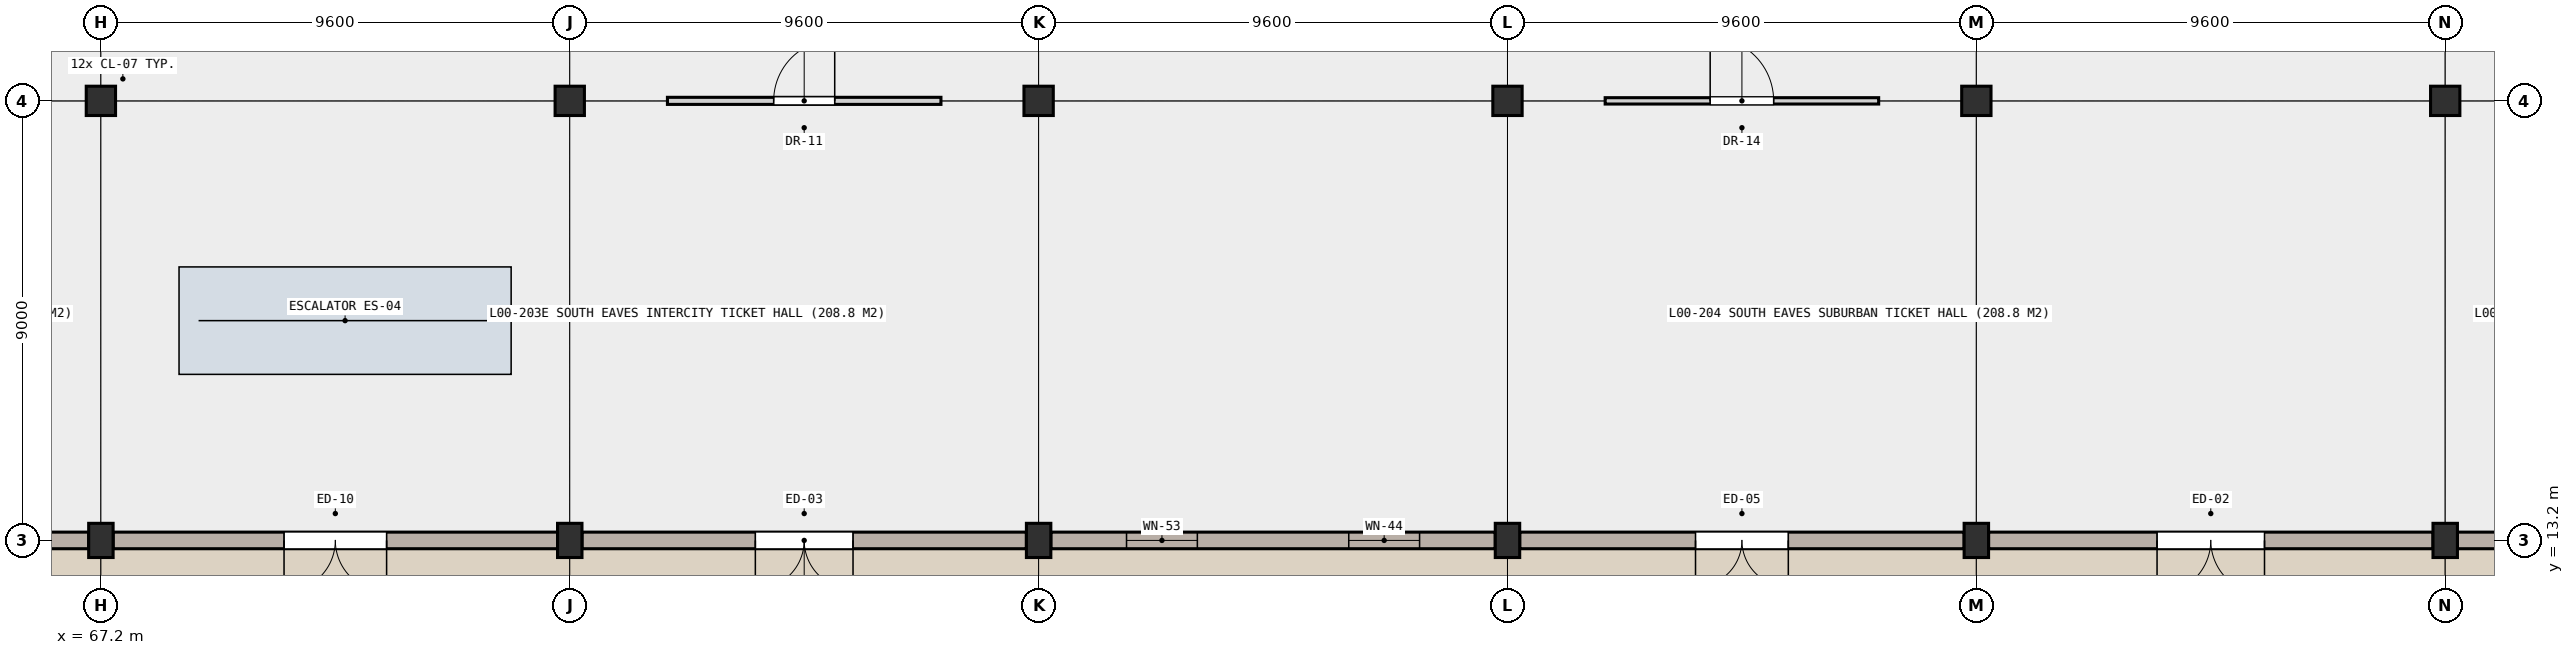
"""IFC4 building model, lengths in metres.
Left out: names, types, materials, properties, quantities, classifications, styles, units other than length and angle.
Written with IfcOpenShell. Run it as: python <this file> out.ifc"""

import sys

from ifc_helpers import new_model, si_unit, direction, frame, frame_2d, origin, origin_2d, place, context, subcontext, project, spatial, rectangle, hollow_rectangle, extrude, element, fill, save


model = new_model("IFC4")
c1 = context("Model", 3, precision=1e-05, world=origin(), true_north=direction((0.0, 1.0)))
c2 = subcontext(c1, "Body", "Model", "MODEL_VIEW")
j1 = project(units=[si_unit("LENGTHUNIT", "METRE"), si_unit("PLANEANGLEUNIT", "RADIAN")], contexts=[c1])
p1 = place(None, origin())
s1 = spatial("IfcSite", under=j1, at=p1, CompositionType="ELEMENT")
p2 = place(p1, origin())
s2 = spatial("IfcBuilding", under=s1, at=p2, CompositionType="ELEMENT")
p3 = place(p2, origin())
s3 = spatial("IfcBuildingStorey", under=s2, at=p3, CompositionType="ELEMENT", Elevation=0.0)
p4 = place(p3, frame((67.2, 13.2, 0.0), z_axis=(0.0, 0.0, 1.0), x_axis=(1.0, 0.0, 0.0)))
e1 = element("IfcColumn", 1, at=p4, inside=s3, PredefinedType="COLUMN", context=c2, shape_type="SweptSolid", body=[
    extrude(hollow_rectangle(XDim=0.5, YDim=0.7, WallThickness=0.032, at=origin_2d()), origin(), (0.0, 0.0, 1.0), 5.4),
])
p5 = place(p3, frame((67.2, 22.2, 0.0), z_axis=(0.0, 0.0, 1.0), x_axis=(1.0, 0.0, 0.0)))
e2 = element("IfcColumn", 2, at=p5, inside=s3, PredefinedType="COLUMN", context=c2, shape_type="SweptSolid", body=[
    extrude(hollow_rectangle(XDim=0.6, YDim=0.6, WallThickness=0.03, at=origin_2d()), origin(), (0.0, 0.0, 1.0), 5.4),
])
p6 = place(p3, frame((76.8, 13.2, 0.0), z_axis=(0.0, 0.0, 1.0), x_axis=(1.0, 0.0, 0.0)))
e3 = element("IfcColumn", 3, at=p6, inside=s3, PredefinedType="COLUMN", context=c2, shape_type="SweptSolid", body=[
    extrude(hollow_rectangle(XDim=0.5, YDim=0.7, WallThickness=0.032, at=origin_2d()), origin(), (0.0, 0.0, 1.0), 5.4),
])
p7 = place(p3, frame((76.8, 22.2, 0.0), z_axis=(0.0, 0.0, 1.0), x_axis=(1.0, 0.0, 0.0)))
e4 = element("IfcColumn", 4, at=p7, inside=s3, PredefinedType="COLUMN", context=c2, shape_type="SweptSolid", body=[
    extrude(hollow_rectangle(XDim=0.6, YDim=0.6, WallThickness=0.03, at=origin_2d()), origin(), (0.0, 0.0, 1.0), 5.4),
])
p8 = place(p3, frame((86.4, 13.2, 0.0), z_axis=(0.0, 0.0, 1.0), x_axis=(1.0, 0.0, 0.0)))
e5 = element("IfcColumn", 5, at=p8, inside=s3, PredefinedType="COLUMN", context=c2, shape_type="SweptSolid", body=[
    extrude(hollow_rectangle(XDim=0.5, YDim=0.7, WallThickness=0.032, at=origin_2d()), origin(), (0.0, 0.0, 1.0), 5.4),
])
p9 = place(p3, frame((86.4, 22.2, 0.0), z_axis=(0.0, 0.0, 1.0), x_axis=(1.0, 0.0, 0.0)))
e6 = element("IfcColumn", 6, at=p9, inside=s3, PredefinedType="COLUMN", context=c2, shape_type="SweptSolid", body=[
    extrude(hollow_rectangle(XDim=0.6, YDim=0.6, WallThickness=0.03, at=origin_2d()), origin(), (0.0, 0.0, 1.0), 5.4),
])
p10 = place(p3, frame((96.0, 13.2, 0.0), z_axis=(0.0, 0.0, 1.0), x_axis=(1.0, 0.0, 0.0)))
e7 = element("IfcColumn", 7, at=p10, inside=s3, PredefinedType="COLUMN", context=c2, shape_type="SweptSolid", body=[
    extrude(hollow_rectangle(XDim=0.5, YDim=0.7, WallThickness=0.032, at=origin_2d()), origin(), (0.0, 0.0, 1.0), 5.4),
])
p11 = place(p3, frame((96.0, 22.2, 0.0), z_axis=(0.0, 0.0, 1.0), x_axis=(1.0, 0.0, 0.0)))
e8 = element("IfcColumn", 8, at=p11, inside=s3, PredefinedType="COLUMN", context=c2, shape_type="SweptSolid", body=[
    extrude(hollow_rectangle(XDim=0.6, YDim=0.6, WallThickness=0.03, at=origin_2d()), origin(), (0.0, 0.0, 1.0), 5.4),
])
p12 = place(p3, frame((105.6, 13.2, 0.0), z_axis=(0.0, 0.0, 1.0), x_axis=(1.0, 0.0, 0.0)))
e9 = element("IfcColumn", 9, at=p12, inside=s3, PredefinedType="COLUMN", context=c2, shape_type="SweptSolid", body=[
    extrude(hollow_rectangle(XDim=0.5, YDim=0.7, WallThickness=0.032, at=origin_2d()), origin(), (0.0, 0.0, 1.0), 5.4),
])
p13 = place(p3, frame((105.6, 22.2, 0.0), z_axis=(0.0, 0.0, 1.0), x_axis=(1.0, 0.0, 0.0)))
e10 = element("IfcColumn", 10, at=p13, inside=s3, PredefinedType="COLUMN", context=c2, shape_type="SweptSolid", body=[
    extrude(hollow_rectangle(XDim=0.6, YDim=0.6, WallThickness=0.03, at=origin_2d()), origin(), (0.0, 0.0, 1.0), 5.4),
])
p14 = place(p3, frame((115.2, 13.2, 0.0), z_axis=(0.0, 0.0, 1.0), x_axis=(1.0, 0.0, 0.0)))
e11 = element("IfcColumn", 11, at=p14, inside=s3, PredefinedType="COLUMN", context=c2, shape_type="SweptSolid", body=[
    extrude(hollow_rectangle(XDim=0.5, YDim=0.7, WallThickness=0.032, at=origin_2d()), origin(), (0.0, 0.0, 1.0), 5.4),
])
p15 = place(p3, frame((115.2, 22.2, 0.0), z_axis=(0.0, 0.0, 1.0), x_axis=(1.0, 0.0, 0.0)))
e12 = element("IfcColumn", 12, at=p15, inside=s3, PredefinedType="COLUMN", context=c2, shape_type="SweptSolid", body=[
    extrude(hollow_rectangle(XDim=0.6, YDim=0.6, WallThickness=0.03, at=origin_2d()), origin(), (0.0, 0.0, 1.0), 5.4),
])
p16 = place(p3, frame((66.95, 13.2, 0.0), z_axis=(0.0, 0.0, 1.0), x_axis=(-1.0, 0.0, 0.0)))
e13 = element("IfcWall", 13, at=p16, inside=s3, PredefinedType="SOLIDWALL", context=c2, shape_type="SweptSolid", body=[
    extrude(rectangle(XDim=9.1, YDim=0.34, at=frame_2d((4.55, 0.0))), origin(), (0.0, 0.0, 1.0), 4.49),
])
p17 = place(p16, frame((3.45, 0.0, 0.0)))
e14 = element("IfcOpeningElement", 14, at=p17, cuts=e13, PredefinedType="OPENING", context=c2, shape_type="SweptSolid", body=[
    extrude(rectangle(XDim=2.2, YDim=2.55, at=frame_2d((1.1, 1.275))), frame((0.0, 0.18, 0.0), z_axis=(0.0, -1.0, 0.0), x_axis=(1.0, 0.0, 0.0)), (0.0, 0.0, 1.0), 0.36),
])
p18 = place(p3, frame((76.55, 13.2, 0.0), z_axis=(0.0, 0.0, 1.0), x_axis=(-1.0, 0.0, 0.0)))
e15 = element("IfcWall", 15, at=p18, inside=s3, PredefinedType="SOLIDWALL", context=c2, shape_type="SweptSolid", body=[
    extrude(rectangle(XDim=9.1, YDim=0.34, at=frame_2d((4.55, 0.0))), origin(), (0.0, 0.0, 1.0), 4.49),
])
p19 = place(p18, frame((3.5, 0.0, 0.0)))
e16 = element("IfcOpeningElement", 16, at=p19, cuts=e15, PredefinedType="OPENING", context=c2, shape_type="SweptSolid", body=[
    extrude(rectangle(XDim=2.1, YDim=2.5, at=frame_2d((1.05, 1.25))), frame((0.0, 0.18, 0.0), z_axis=(0.0, -1.0, 0.0), x_axis=(1.0, 0.0, 0.0)), (0.0, 0.0, 1.0), 0.36),
])
p20 = place(p3, frame((86.15, 13.2, 0.0), z_axis=(0.0, 0.0, 1.0), x_axis=(-1.0, 0.0, 0.0)))
e17 = element("IfcWall", 17, at=p20, inside=s3, PredefinedType="SOLIDWALL", context=c2, shape_type="SweptSolid", body=[
    extrude(rectangle(XDim=9.1, YDim=0.34, at=frame_2d((4.55, 0.0))), origin(), (0.0, 0.0, 1.0), 4.49),
])
p21 = place(p20, frame((3.55, 0.0, 0.0)))
e18 = element("IfcOpeningElement", 18, at=p21, cuts=e17, PredefinedType="OPENING", context=c2, shape_type="SweptSolid", body=[
    extrude(rectangle(XDim=2.0, YDim=2.45, at=frame_2d((1.0, 1.225))), frame((0.0, 0.18, 0.0), z_axis=(0.0, -1.0, 0.0), x_axis=(1.0, 0.0, 0.0)), (0.0, 0.0, 1.0), 0.36),
])
p22 = place(p3, frame((95.75, 13.2, 0.0), z_axis=(0.0, 0.0, 1.0), x_axis=(-1.0, 0.0, 0.0)))
e19 = element("IfcWall", 19, at=p22, inside=s3, PredefinedType="SOLIDWALL", context=c2, shape_type="SweptSolid", body=[
    extrude(rectangle(XDim=9.1, YDim=0.34, at=frame_2d((4.55, 0.0))), origin(), (0.0, 0.0, 1.0), 4.49),
])
p23 = place(p22, frame((1.55, 0.0, 0.85)))
e20 = element("IfcOpeningElement", 20, at=p23, cuts=e19, PredefinedType="OPENING", context=c2, shape_type="SweptSolid", body=[
    extrude(rectangle(XDim=1.45, YDim=1.5, at=frame_2d((0.725, 0.75))), frame((0.0, 0.18, 0.0), z_axis=(0.0, -1.0, 0.0), x_axis=(1.0, 0.0, 0.0)), (0.0, 0.0, 1.0), 0.36),
])
p24 = place(p22, frame((6.1, 0.0, 0.85)))
e21 = element("IfcOpeningElement", 21, at=p24, cuts=e19, PredefinedType="OPENING", context=c2, shape_type="SweptSolid", body=[
    extrude(rectangle(XDim=1.45, YDim=1.85, at=frame_2d((0.725, 0.925))), frame((0.0, 0.18, 0.0), z_axis=(0.0, -1.0, 0.0), x_axis=(1.0, 0.0, 0.0)), (0.0, 0.0, 1.0), 0.36),
])
p25 = place(p3, frame((105.35, 13.2, 0.0), z_axis=(0.0, 0.0, 1.0), x_axis=(-1.0, 0.0, 0.0)))
e22 = element("IfcWall", 22, at=p25, inside=s3, PredefinedType="SOLIDWALL", context=c2, shape_type="SweptSolid", body=[
    extrude(rectangle(XDim=9.1, YDim=0.34, at=frame_2d((4.55, 0.0))), origin(), (0.0, 0.0, 1.0), 4.49),
])
p26 = place(p25, frame((3.6, 0.0, 0.0)))
e23 = element("IfcOpeningElement", 23, at=p26, cuts=e22, PredefinedType="OPENING", context=c2, shape_type="SweptSolid", body=[
    extrude(rectangle(XDim=1.9, YDim=2.4, at=frame_2d((0.95, 1.2))), frame((0.0, 0.18, 0.0), z_axis=(0.0, -1.0, 0.0), x_axis=(1.0, 0.0, 0.0)), (0.0, 0.0, 1.0), 0.36),
])
p27 = place(p3, frame((114.95, 13.2, 0.0), z_axis=(0.0, 0.0, 1.0), x_axis=(-1.0, 0.0, 0.0)))
e24 = element("IfcWall", 24, at=p27, inside=s3, PredefinedType="SOLIDWALL", context=c2, shape_type="SweptSolid", body=[
    extrude(rectangle(XDim=9.1, YDim=0.34, at=frame_2d((4.55, 0.0))), origin(), (0.0, 0.0, 1.0), 4.49),
])
p28 = place(p27, frame((3.45, 0.0, 0.0)))
e25 = element("IfcOpeningElement", 25, at=p28, cuts=e24, PredefinedType="OPENING", context=c2, shape_type="SweptSolid", body=[
    extrude(rectangle(XDim=2.2, YDim=2.55, at=frame_2d((1.1, 1.275))), frame((0.0, 0.18, 0.0), z_axis=(0.0, -1.0, 0.0), x_axis=(1.0, 0.0, 0.0)), (0.0, 0.0, 1.0), 0.36),
])
p29 = place(p3, frame((124.55, 13.2, 0.0), z_axis=(0.0, 0.0, 1.0), x_axis=(-1.0, 0.0, 0.0)))
e26 = element("IfcWall", 26, at=p29, inside=s3, PredefinedType="SOLIDWALL", context=c2, shape_type="SweptSolid", body=[
    extrude(rectangle(XDim=9.1, YDim=0.34, at=frame_2d((4.55, 0.0))), origin(), (0.0, 0.0, 1.0), 4.49),
])
p30 = place(p29, frame((3.5, 0.0, 0.0)))
e27 = element("IfcOpeningElement", 27, at=p30, cuts=e26, PredefinedType="OPENING", context=c2, shape_type="SweptSolid", body=[
    extrude(rectangle(XDim=2.1, YDim=2.5, at=frame_2d((1.05, 1.25))), frame((0.0, 0.18, 0.0), z_axis=(0.0, -1.0, 0.0), x_axis=(1.0, 0.0, 0.0)), (0.0, 0.0, 1.0), 0.36),
])
p31 = place(p3, frame((78.8, 22.2, 0.0), z_axis=(0.0, 0.0, 1.0), x_axis=(1.0, 0.0, 0.0)))
e28 = element("IfcWall", 28, at=p31, inside=s3, PredefinedType="PARTITIONING", context=c2, shape_type="SweptSolid", body=[
    extrude(rectangle(XDim=5.6, YDim=0.145, at=frame_2d((2.8, 0.0))), origin(), (0.0, 0.0, 1.0), 4.49),
])
p32 = place(p31, frame((2.175, 0.0, 0.0)))
e29 = element("IfcOpeningElement", 29, at=p32, cuts=e28, PredefinedType="OPENING", context=c2, shape_type="SweptSolid", body=[
    extrude(rectangle(XDim=1.25, YDim=2.16, at=frame_2d((0.625, 1.08))), frame((0.0, 0.083, 0.0), z_axis=(0.0, -1.0, 0.0), x_axis=(1.0, 0.0, 0.0)), (0.0, 0.0, 1.0), 0.165),
])
p33 = place(p3, frame((98.0, 22.2, 0.0), z_axis=(0.0, 0.0, 1.0), x_axis=(1.0, 0.0, 0.0)))
e30 = element("IfcWall", 30, at=p33, inside=s3, PredefinedType="PARTITIONING", context=c2, shape_type="SweptSolid", body=[
    extrude(rectangle(XDim=5.6, YDim=0.13, at=frame_2d((2.8, 0.0))), origin(), (0.0, 0.0, 1.0), 4.49),
])
p34 = place(p33, frame((2.15, 0.0, 0.0)))
e31 = element("IfcOpeningElement", 31, at=p34, cuts=e30, PredefinedType="OPENING", context=c2, shape_type="SweptSolid", body=[
    extrude(rectangle(XDim=1.3, YDim=2.16, at=frame_2d((0.65, 1.08))), frame((0.0, 0.075, 0.0), z_axis=(0.0, -1.0, 0.0), x_axis=(1.0, 0.0, 0.0)), (0.0, 0.0, 1.0), 0.15),
])
p35 = place(p19, origin())
e32 = element("IfcDoor", 32, at=p35, inside=s3, OperationType="DOUBLE_DOOR_SINGLE_SWING", PredefinedType="DOOR", context=c2, shape_type="SweptSolid", body=[
    extrude(rectangle(XDim=2.1, YDim=2.5, at=frame_2d((1.05, 1.25))), frame((0.0, 0.025, 0.0), z_axis=(0.0, -1.0, 0.0), x_axis=(1.0, 0.0, 0.0)), (0.0, 0.0, 1.0), 0.05),
])
fill(e16, e32)
p36 = place(p21, origin())
e33 = element("IfcDoor", 33, at=p36, inside=s3, OperationType="DOUBLE_DOOR_SINGLE_SWING", PredefinedType="DOOR", context=c2, shape_type="SweptSolid", body=[
    extrude(rectangle(XDim=2.0, YDim=2.45, at=frame_2d((1.0, 1.225))), frame((0.0, 0.025, 0.0), z_axis=(0.0, -1.0, 0.0), x_axis=(1.0, 0.0, 0.0)), (0.0, 0.0, 1.0), 0.05),
])
fill(e18, e33)
p37 = place(p23, origin())
e34 = element("IfcWindow", 34, at=p37, inside=s3, PartitioningType="SINGLE_PANEL", PredefinedType="WINDOW", context=c2, shape_type="SweptSolid", body=[
    extrude(rectangle(XDim=1.45, YDim=1.5, at=frame_2d((0.725, 0.75))), frame((0.0, 0.03, 0.0), z_axis=(0.0, -1.0, 0.0), x_axis=(1.0, 0.0, 0.0)), (0.0, 0.0, 1.0), 0.06),
])
fill(e20, e34)
p38 = place(p24, origin())
e35 = element("IfcWindow", 35, at=p38, inside=s3, PartitioningType="SINGLE_PANEL", PredefinedType="WINDOW", context=c2, shape_type="SweptSolid", body=[
    extrude(rectangle(XDim=1.45, YDim=1.85, at=frame_2d((0.725, 0.925))), frame((0.0, 0.03, 0.0), z_axis=(0.0, -1.0, 0.0), x_axis=(1.0, 0.0, 0.0)), (0.0, 0.0, 1.0), 0.06),
])
fill(e21, e35)
p39 = place(p26, origin())
e36 = element("IfcDoor", 36, at=p39, inside=s3, OperationType="DOUBLE_DOOR_SINGLE_SWING", PredefinedType="DOOR", context=c2, shape_type="SweptSolid", body=[
    extrude(rectangle(XDim=1.9, YDim=2.4, at=frame_2d((0.95, 1.2))), frame((0.0, 0.025, 0.0), z_axis=(0.0, -1.0, 0.0), x_axis=(1.0, 0.0, 0.0)), (0.0, 0.0, 1.0), 0.05),
])
fill(e23, e36)
p40 = place(p28, origin())
e37 = element("IfcDoor", 37, at=p40, inside=s3, OperationType="DOUBLE_DOOR_SINGLE_SWING", PredefinedType="DOOR", context=c2, shape_type="SweptSolid", body=[
    extrude(rectangle(XDim=2.2, YDim=2.55, at=frame_2d((1.1, 1.275))), frame((0.0, 0.025, 0.0), z_axis=(0.0, -1.0, 0.0), x_axis=(1.0, 0.0, 0.0)), (0.0, 0.0, 1.0), 0.05),
])
fill(e25, e37)
p41 = place(p32, origin())
e38 = element("IfcDoor", 38, at=p41, inside=s3, OperationType="SINGLE_SWING_RIGHT", PredefinedType="DOOR", context=c2, shape_type="SweptSolid", body=[
    extrude(rectangle(XDim=1.25, YDim=2.16, at=frame_2d((0.625, 1.08))), frame((0.0, 0.025, 0.0), z_axis=(0.0, -1.0, 0.0), x_axis=(1.0, 0.0, 0.0)), (0.0, 0.0, 1.0), 0.05),
])
fill(e29, e38)
p42 = place(p34, origin())
e39 = element("IfcDoor", 39, at=p42, inside=s3, OperationType="SINGLE_SWING_LEFT", PredefinedType="DOOR", context=c2, shape_type="SweptSolid", body=[
    extrude(rectangle(XDim=1.3, YDim=2.16, at=frame_2d((0.65, 1.08))), frame((0.0, 0.025, 0.0), z_axis=(0.0, -1.0, 0.0), x_axis=(1.0, 0.0, 0.0)), (0.0, 0.0, 1.0), 0.05),
])
fill(e31, e39)
save(model, sys.argv[1])
